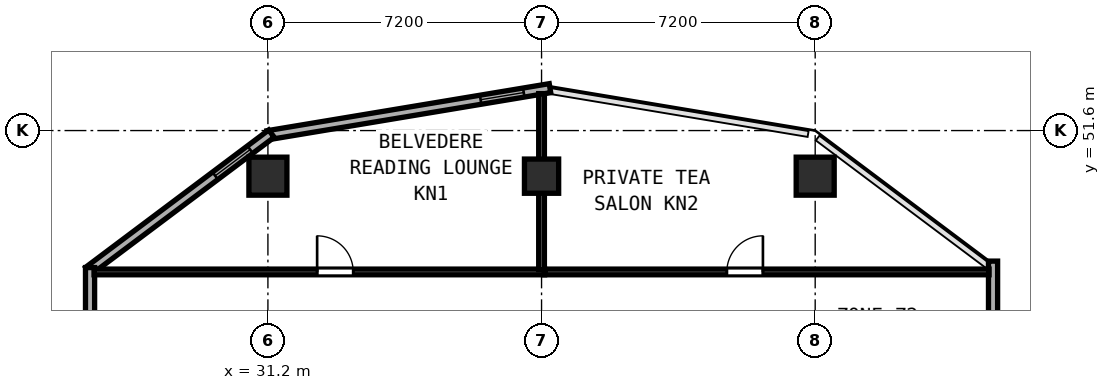
"""IFC4 building model, lengths in metres.
Left out: names, types, materials, properties, quantities, classifications, styles, units other than length and angle.
Written with IfcOpenShell. Run it as: python <this file> out.ifc"""

import sys

from ifc_helpers import new_model, si_unit, direction, frame, frame_2d, origin, origin_2d, place, context, subcontext, project, spatial, rectangle, hollow_rectangle, extrude, element, fill, save


model = new_model("IFC4")
c1 = context("Model", 3, precision=1e-05, world=origin(), true_north=direction((0.0, 1.0)))
c2 = subcontext(c1, "Body", "Model", "MODEL_VIEW")
j1 = project(units=[si_unit("LENGTHUNIT", "METRE"), si_unit("PLANEANGLEUNIT", "RADIAN")], contexts=[c1])
p1 = place(None, origin())
s1 = spatial("IfcSite", under=j1, at=p1, CompositionType="ELEMENT")
p2 = place(p1, origin())
s2 = spatial("IfcBuilding", under=s1, at=p2, CompositionType="ELEMENT")
p3 = place(p2, frame((0.0, 0.0, 106.0)))
s3 = spatial("IfcBuildingStorey", under=s2, at=p3, CompositionType="ELEMENT", Elevation=106.0)
for number, where, z_axis, x_axis in (
    (1, (31.2, 50.4, 0.0), (0.0, 0.0, 1.0), (1.0, 0.0, 0.0)),
    (2, (45.6, 50.4, 0.0), (0.0, 0.0, 1.0), (1.0, 0.0, 0.0)),
):
    element("IfcColumn", number, at=place(p3, frame(where, z_axis=z_axis, x_axis=x_axis)), inside=s3, PredefinedType="COLUMN", context=c2, shape_type="SweptSolid", body=[
        extrude(hollow_rectangle(XDim=1.0, YDim=1.0, WallThickness=0.038, at=origin_2d()), origin(), (0.0, 0.0, 1.0), 3.8),
    ])
p4 = place(p3, frame((38.4, 50.4, 0.0), z_axis=(0.0, 0.0, 1.0), x_axis=(1.0, 0.0, 0.0)))
e3 = element("IfcColumn", 3, at=p4, inside=s3, PredefinedType="COLUMN", context=c2, shape_type="SweptSolid", body=[
    extrude(hollow_rectangle(XDim=0.9, YDim=0.9, WallThickness=0.034, at=origin_2d()), origin(), (0.0, 0.0, 1.0), 3.8),
])
p5 = place(p3, frame((50.28, 46.625, 0.0), z_axis=(0.0, 0.0, 1.0), x_axis=(0.0, 1.0, 0.0)))
e4 = element("IfcWall", 4, at=p5, inside=s3, PredefinedType="SOLIDWALL", context=c2, shape_type="SweptSolid", body=[
    extrude(rectangle(XDim=1.54, YDim=0.24, at=frame_2d((0.77, 0.0))), origin(), (0.0, 0.0, 1.0), 3.6),
])
p6 = place(p3, frame((38.622, 52.715, 0.0), z_axis=(0.0, 0.0, 1.0), x_axis=(-0.98639129485, -0.164414760418, 0.0)))
e5 = element("IfcWall", 5, at=p6, inside=s3, PredefinedType="SOLIDWALL", context=c2, shape_type="SweptSolid", body=[
    extrude(rectangle(XDim=7.53, YDim=0.24, at=frame_2d((3.765, 0.0))), origin(), (0.0, 0.0, 1.0), 3.6),
])
p7 = place(p6, frame((0.7, 0.0, 0.85)))
e6 = element("IfcOpeningElement", 6, at=p7, cuts=e5, PredefinedType="OPENING", context=c2, shape_type="SweptSolid", body=[
    extrude(rectangle(XDim=1.15, YDim=1.8, at=frame_2d((0.575, 0.9))), frame((0.0, 0.13, 0.0), z_axis=(0.0, -1.0, 0.0), x_axis=(1.0, 0.0, 0.0)), (0.0, 0.0, 1.0), 0.26),
])
p8 = place(p3, frame((31.292, 51.519, 0.0), z_axis=(0.0, 0.0, 1.0), x_axis=(-0.8, -0.6, 0.0)))
e7 = element("IfcWall", 7, at=p8, inside=s3, PredefinedType="SOLIDWALL", context=c2, shape_type="SweptSolid", body=[
    extrude(rectangle(XDim=6.021, YDim=0.24, at=frame_2d((3.01, 0.0))), origin(), (0.0, 0.0, 1.0), 3.6),
])
p9 = place(p8, frame((0.7, 0.0, 0.85)))
e8 = element("IfcOpeningElement", 8, at=p9, cuts=e7, PredefinedType="OPENING", context=c2, shape_type="SweptSolid", body=[
    extrude(rectangle(XDim=1.15, YDim=1.8, at=frame_2d((0.575, 0.9))), frame((0.0, 0.13, 0.0), z_axis=(0.0, -1.0, 0.0), x_axis=(1.0, 0.0, 0.0)), (0.0, 0.0, 1.0), 0.26),
])
p10 = place(p3, frame((26.52, 47.995, 0.0), z_axis=(0.0, 0.0, 1.0), x_axis=(0.0, -1.0, 0.0)))
e9 = element("IfcWall", 9, at=p10, inside=s3, PredefinedType="SOLIDWALL", context=c2, shape_type="SweptSolid", body=[
    extrude(rectangle(XDim=1.37, YDim=0.24, at=frame_2d((0.685, 0.0))), origin(), (0.0, 0.0, 1.0), 3.6),
])
p11 = place(p3, frame((26.625, 47.88, 0.0), z_axis=(0.0, 0.0, 1.0), x_axis=(1.0, 0.0, 0.0)))
e10 = element("IfcWall", 10, at=p11, inside=s3, PredefinedType="PARTITIONING", context=c2, shape_type="SweptSolid", body=[
    extrude(rectangle(XDim=11.855, YDim=0.15, at=frame_2d((5.927, 0.0))), origin(), (0.0, 0.0, 1.0), 3.6),
])
p12 = place(p11, frame((5.87, 0.0, 0.0)))
e11 = element("IfcOpeningElement", 11, at=p12, cuts=e10, PredefinedType="OPENING", context=c2, shape_type="SweptSolid", body=[
    extrude(rectangle(XDim=0.95, YDim=2.12, at=frame_2d((0.475, 1.06))), frame((0.0, 0.085, 0.0), z_axis=(0.0, -1.0, 0.0), x_axis=(1.0, 0.0, 0.0)), (0.0, 0.0, 1.0), 0.17),
])
p13 = place(p3, frame((38.4, 47.94, 0.0), z_axis=(0.0, 0.0, 1.0), x_axis=(0.0, 1.0, 0.0)))
e12 = element("IfcWall", 12, at=p13, inside=s3, PredefinedType="PARTITIONING", context=c2, shape_type="SweptSolid", body=[
    extrude(rectangle(XDim=4.632, YDim=0.15, at=frame_2d((2.316, 0.0))), origin(), (0.0, 0.0, 1.0), 3.6),
])
p14 = place(p3, frame((38.482, 47.88, 0.0), z_axis=(0.0, 0.0, 1.0), x_axis=(1.0, 0.0, 0.0)))
e13 = element("IfcWall", 13, at=p14, inside=s3, PredefinedType="PARTITIONING", context=c2, shape_type="SweptSolid", body=[
    extrude(rectangle(XDim=11.693, YDim=0.15, at=frame_2d((5.847, 0.0))), origin(), (0.0, 0.0, 1.0), 3.6),
])
p15 = place(p14, frame((4.793, 0.0, 0.0)))
e14 = element("IfcOpeningElement", 14, at=p15, cuts=e13, PredefinedType="OPENING", context=c2, shape_type="SweptSolid", body=[
    extrude(rectangle(XDim=0.95, YDim=2.12, at=frame_2d((0.475, 1.06))), frame((0.0, 0.085, 0.0), z_axis=(0.0, -1.0, 0.0), x_axis=(1.0, 0.0, 0.0)), (0.0, 0.0, 1.0), 0.17),
])
p16 = place(p7, origin())
e15 = element("IfcWindow", 15, at=p16, inside=s3, PartitioningType="SINGLE_PANEL", PredefinedType="WINDOW", context=c2, shape_type="SweptSolid", body=[
    extrude(rectangle(XDim=1.15, YDim=1.8, at=frame_2d((0.575, 0.9))), frame((0.0, 0.03, 0.0), z_axis=(0.0, -1.0, 0.0), x_axis=(1.0, 0.0, 0.0)), (0.0, 0.0, 1.0), 0.06),
])
fill(e6, e15)
p17 = place(p9, origin())
e16 = element("IfcWindow", 16, at=p17, inside=s3, PartitioningType="SINGLE_PANEL", PredefinedType="WINDOW", context=c2, shape_type="SweptSolid", body=[
    extrude(rectangle(XDim=1.15, YDim=1.8, at=frame_2d((0.575, 0.9))), frame((0.0, 0.03, 0.0), z_axis=(0.0, -1.0, 0.0), x_axis=(1.0, 0.0, 0.0)), (0.0, 0.0, 1.0), 0.06),
])
fill(e8, e16)
p18 = place(p12, origin())
e17 = element("IfcDoor", 17, at=p18, inside=s3, OperationType="SINGLE_SWING_LEFT", PredefinedType="DOOR", context=c2, shape_type="SweptSolid", body=[
    extrude(rectangle(XDim=0.95, YDim=2.12, at=frame_2d((0.475, 1.06))), frame((0.0, 0.025, 0.0), z_axis=(0.0, -1.0, 0.0), x_axis=(1.0, 0.0, 0.0)), (0.0, 0.0, 1.0), 0.05),
])
fill(e11, e17)
p19 = place(p15, origin())
e18 = element("IfcDoor", 18, at=p19, inside=s3, OperationType="SINGLE_SWING_RIGHT", PredefinedType="DOOR", context=c2, shape_type="SweptSolid", body=[
    extrude(rectangle(XDim=0.95, YDim=2.12, at=frame_2d((0.475, 1.06))), frame((0.0, 0.025, 0.0), z_axis=(0.0, -1.0, 0.0), x_axis=(1.0, 0.0, 0.0)), (0.0, 0.0, 1.0), 0.05),
])
fill(e14, e18)
save(model, sys.argv[1])
